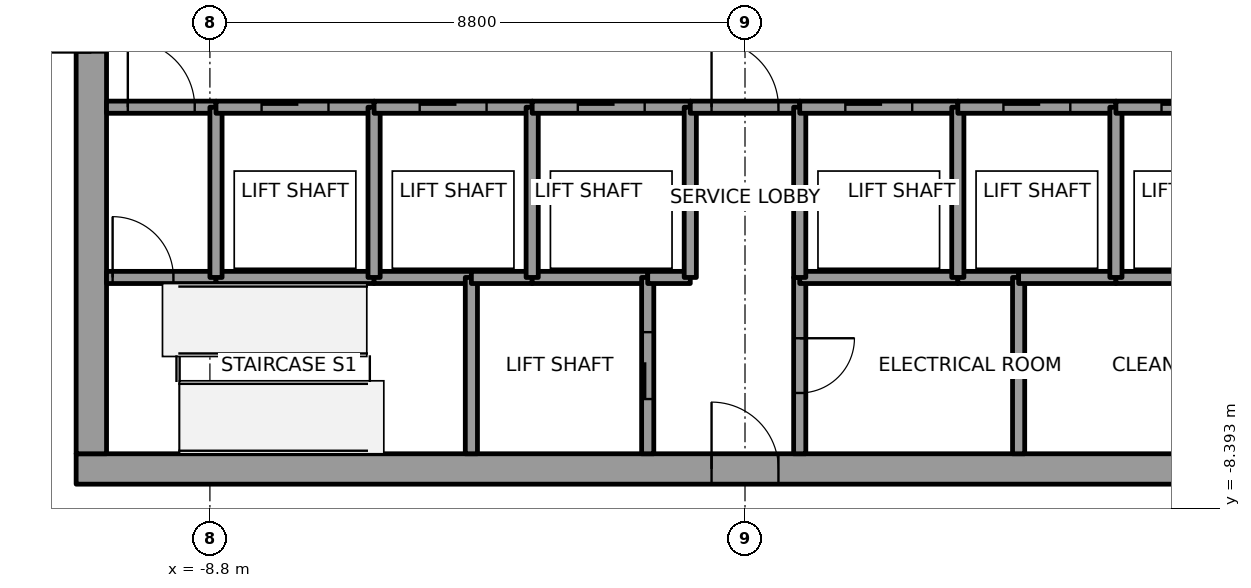
"""IFC4 building model, lengths in metres.
Left out: names, types, materials, properties, quantities, classifications, styles, units other than length and angle.
Written with IfcOpenShell. Run it as: python <this file> out.ifc"""

import sys

from ifc_helpers import new_model, si_unit, direction, frame, frame_2d, origin, place, context, subcontext, project, spatial, rectangle, extrude, element, fill, save


model = new_model("IFC4")
c1 = context("Model", 3, precision=1e-05, world=origin(), true_north=direction((0.0, 1.0)))
c2 = subcontext(c1, "Body", "Model", "MODEL_VIEW")
j1 = project(units=[si_unit("LENGTHUNIT", "METRE"), si_unit("PLANEANGLEUNIT", "RADIAN")], contexts=[c1])
p1 = place(None, origin())
s1 = spatial("IfcSite", under=j1, at=p1, CompositionType="ELEMENT")
p2 = place(p1, origin())
s2 = spatial("IfcBuilding", under=s1, at=p2, CompositionType="ELEMENT")
p3 = place(p2, frame((0.0, 0.0, 279.0)))
s3 = spatial("IfcBuildingStorey", under=s2, at=p3, CompositionType="ELEMENT", Elevation=279.0)
p4 = place(p3, frame((-11.0, -7.75, 0.0), z_axis=(0.0, 0.0, 1.0), x_axis=(1.0, 0.0, 0.0)))
e1 = element("IfcWall", 1, at=p4, inside=s3, PredefinedType="SHEAR", context=c2, shape_type="SweptSolid", body=[
    extrude(rectangle(XDim=22.0, YDim=0.5, at=frame_2d((11.0, 0.0))), origin(), (0.0, 0.0, 1.0), 4.0),
])
p5 = place(p4, frame((10.45, 0.0, 0.0)))
e2 = element("IfcOpeningElement", 2, at=p5, cuts=e1, PredefinedType="OPENING", context=c2, shape_type="SweptSolid", body=[
    extrude(rectangle(XDim=1.1, YDim=2.1, at=frame_2d((0.55, 1.05))), frame((0.0, 0.25, 0.0), z_axis=(0.0, -1.0, 0.0), x_axis=(1.0, 0.0, 0.0)), (0.0, 0.0, 1.0), 0.5),
])
p6 = place(p3, frame((-10.75, -7.5, 0.0), z_axis=(0.0, 0.0, 1.0), x_axis=(0.0, 1.0, 0.0)))
e3 = element("IfcWall", 3, at=p6, inside=s3, PredefinedType="SHEAR", context=c2, shape_type="SweptSolid", body=[
    extrude(rectangle(XDim=15.0, YDim=0.5, at=frame_2d((7.5, 0.0))), origin(), (0.0, 0.0, 1.0), 4.0),
])
p7 = place(p6, frame((6.6, 0.0, 0.0)))
e4 = element("IfcOpeningElement", 4, at=p7, cuts=e3, PredefinedType="OPENING", context=c2, shape_type="SweptSolid", body=[
    extrude(rectangle(XDim=1.8, YDim=2.1, at=frame_2d((0.9, 1.05))), frame((0.0, 0.25, 0.0), z_axis=(0.0, -1.0, 0.0), x_axis=(1.0, 0.0, 0.0)), (0.0, 0.0, 1.0), 0.5),
])
p8 = place(p3, frame((-10.5, -4.6, 0.0), z_axis=(0.0, 0.0, 1.0), x_axis=(1.0, 0.0, 0.0)))
e5 = element("IfcWall", 5, at=p8, inside=s3, PredefinedType="SOLIDWALL", context=c2, shape_type="SweptSolid", body=[
    extrude(rectangle(XDim=1.8, YDim=0.2, at=frame_2d((0.9, 0.0))), origin(), (0.0, 0.0, 1.0), 3.85),
])
p9 = place(p8, frame((0.1, 0.0, 0.0)))
e6 = element("IfcOpeningElement", 6, at=p9, cuts=e5, PredefinedType="OPENING", context=c2, shape_type="SweptSolid", body=[
    extrude(rectangle(XDim=1.0, YDim=2.1, at=frame_2d((0.5, 1.05))), frame((0.0, 0.1, 0.0), z_axis=(0.0, -1.0, 0.0), x_axis=(1.0, 0.0, 0.0)), (0.0, 0.0, 1.0), 0.2),
])
p10 = place(p3, frame((-10.5, -1.8, 0.0), z_axis=(0.0, 0.0, 1.0), x_axis=(1.0, 0.0, 0.0)))
e7 = element("IfcWall", 7, at=p10, inside=s3, PredefinedType="SOLIDWALL", context=c2, shape_type="SweptSolid", body=[
    extrude(rectangle(XDim=1.8, YDim=0.2, at=frame_2d((0.9, 0.0))), origin(), (0.0, 0.0, 1.0), 3.85),
])
p11 = place(p10, frame((0.35, 0.0, 0.0)))
e8 = element("IfcOpeningElement", 8, at=p11, cuts=e7, PredefinedType="OPENING", context=c2, shape_type="SweptSolid", body=[
    extrude(rectangle(XDim=1.1, YDim=2.1, at=frame_2d((0.55, 1.05))), frame((0.0, 0.1, 0.0), z_axis=(0.0, -1.0, 0.0), x_axis=(1.0, 0.0, 0.0)), (0.0, 0.0, 1.0), 0.2),
])
p12 = place(p3, frame((-8.7, -4.6, 0.0), z_axis=(0.0, 0.0, 1.0), x_axis=(1.0, 0.0, 0.0)))
e9 = element("IfcWall", 9, at=p12, inside=s3, PredefinedType="SOLIDWALL", context=c2, shape_type="SweptSolid", body=[
    extrude(rectangle(XDim=2.6, YDim=0.2, at=frame_2d((1.3, 0.0))), origin(), (0.0, 0.0, 1.0), 3.85),
])
p13 = place(p3, frame((-8.7, -4.6, 0.0), z_axis=(0.0, 0.0, 1.0), x_axis=(0.0, 1.0, 0.0)))
e10 = element("IfcWall", 10, at=p13, inside=s3, PredefinedType="SOLIDWALL", context=c2, shape_type="SweptSolid", body=[
    extrude(rectangle(XDim=2.8, YDim=0.2, at=frame_2d((1.4, 0.0))), origin(), (0.0, 0.0, 1.0), 3.85),
])
p14 = place(p3, frame((-8.7, -1.8, 0.0), z_axis=(0.0, 0.0, 1.0), x_axis=(1.0, 0.0, 0.0)))
e11 = element("IfcWall", 11, at=p14, inside=s3, PredefinedType="SOLIDWALL", context=c2, shape_type="SweptSolid", body=[
    extrude(rectangle(XDim=2.6, YDim=0.2, at=frame_2d((1.3, 0.0))), origin(), (0.0, 0.0, 1.0), 3.85),
])
p15 = place(p14, frame((0.75, 0.0, 0.0)))
e12 = element("IfcOpeningElement", 12, at=p15, cuts=e11, PredefinedType="OPENING", context=c2, shape_type="SweptSolid", body=[
    extrude(rectangle(XDim=1.1, YDim=2.1, at=frame_2d((0.55, 1.05))), frame((0.0, 0.1, 0.0), z_axis=(0.0, -1.0, 0.0), x_axis=(1.0, 0.0, 0.0)), (0.0, 0.0, 1.0), 0.2),
])
p16 = place(p3, frame((-6.1, -4.6, 0.0), z_axis=(0.0, 0.0, 1.0), x_axis=(1.0, 0.0, 0.0)))
e13 = element("IfcWall", 13, at=p16, inside=s3, PredefinedType="SOLIDWALL", context=c2, shape_type="SweptSolid", body=[
    extrude(rectangle(XDim=1.6, YDim=0.2, at=frame_2d((0.8, 0.0))), origin(), (0.0, 0.0, 1.0), 3.85),
])
p17 = place(p3, frame((-6.1, -4.6, 0.0), z_axis=(0.0, 0.0, 1.0), x_axis=(0.0, 1.0, 0.0)))
e14 = element("IfcWall", 14, at=p17, inside=s3, PredefinedType="SOLIDWALL", context=c2, shape_type="SweptSolid", body=[
    extrude(rectangle(XDim=2.8, YDim=0.2, at=frame_2d((1.4, 0.0))), origin(), (0.0, 0.0, 1.0), 3.85),
])
p18 = place(p3, frame((-6.1, -1.8, 0.0), z_axis=(0.0, 0.0, 1.0), x_axis=(1.0, 0.0, 0.0)))
e15 = element("IfcWall", 15, at=p18, inside=s3, PredefinedType="SOLIDWALL", context=c2, shape_type="SweptSolid", body=[
    extrude(rectangle(XDim=2.6, YDim=0.2, at=frame_2d((1.3, 0.0))), origin(), (0.0, 0.0, 1.0), 3.85),
])
p19 = place(p18, frame((0.75, 0.0, 0.0)))
e16 = element("IfcOpeningElement", 16, at=p19, cuts=e15, PredefinedType="OPENING", context=c2, shape_type="SweptSolid", body=[
    extrude(rectangle(XDim=1.1, YDim=2.1, at=frame_2d((0.55, 1.05))), frame((0.0, 0.1, 0.0), z_axis=(0.0, -1.0, 0.0), x_axis=(1.0, 0.0, 0.0)), (0.0, 0.0, 1.0), 0.2),
])
p20 = place(p3, frame((-4.5, -4.6, 0.0), z_axis=(0.0, 0.0, 1.0), x_axis=(0.0, -1.0, 0.0)))
e17 = element("IfcWall", 17, at=p20, inside=s3, PredefinedType="SOLIDWALL", context=c2, shape_type="SweptSolid", body=[
    extrude(rectangle(XDim=2.9, YDim=0.2, at=frame_2d((1.45, 0.0))), origin(), (0.0, 0.0, 1.0), 3.85),
])
p21 = place(p3, frame((-4.5, -4.6, 0.0), z_axis=(0.0, 0.0, 1.0), x_axis=(1.0, 0.0, 0.0)))
e18 = element("IfcWall", 18, at=p21, inside=s3, PredefinedType="SOLIDWALL", context=c2, shape_type="SweptSolid", body=[
    extrude(rectangle(XDim=1.0, YDim=0.2, at=frame_2d((0.5, 0.0))), origin(), (0.0, 0.0, 1.0), 3.85),
])
p22 = place(p3, frame((-3.5, -4.6, 0.0), z_axis=(0.0, 0.0, 1.0), x_axis=(1.0, 0.0, 0.0)))
e19 = element("IfcWall", 19, at=p22, inside=s3, PredefinedType="SOLIDWALL", context=c2, shape_type="SweptSolid", body=[
    extrude(rectangle(XDim=1.9, YDim=0.2, at=frame_2d((0.95, 0.0))), origin(), (0.0, 0.0, 1.0), 3.85),
])
p23 = place(p3, frame((-3.5, -4.6, 0.0), z_axis=(0.0, 0.0, 1.0), x_axis=(0.0, 1.0, 0.0)))
e20 = element("IfcWall", 20, at=p23, inside=s3, PredefinedType="SOLIDWALL", context=c2, shape_type="SweptSolid", body=[
    extrude(rectangle(XDim=2.8, YDim=0.2, at=frame_2d((1.4, 0.0))), origin(), (0.0, 0.0, 1.0), 3.85),
])
p24 = place(p3, frame((-3.5, -1.8, 0.0), z_axis=(0.0, 0.0, 1.0), x_axis=(1.0, 0.0, 0.0)))
e21 = element("IfcWall", 21, at=p24, inside=s3, PredefinedType="SOLIDWALL", context=c2, shape_type="SweptSolid", body=[
    extrude(rectangle(XDim=2.6, YDim=0.2, at=frame_2d((1.3, 0.0))), origin(), (0.0, 0.0, 1.0), 3.85),
])
p25 = place(p24, frame((0.75, 0.0, 0.0)))
e22 = element("IfcOpeningElement", 22, at=p25, cuts=e21, PredefinedType="OPENING", context=c2, shape_type="SweptSolid", body=[
    extrude(rectangle(XDim=1.1, YDim=2.1, at=frame_2d((0.55, 1.05))), frame((0.0, 0.1, 0.0), z_axis=(0.0, -1.0, 0.0), x_axis=(1.0, 0.0, 0.0)), (0.0, 0.0, 1.0), 0.2),
])
p26 = place(p3, frame((-1.6, -7.5, 0.0), z_axis=(0.0, 0.0, 1.0), x_axis=(0.0, 1.0, 0.0)))
e23 = element("IfcWall", 23, at=p26, inside=s3, PredefinedType="SOLIDWALL", context=c2, shape_type="SweptSolid", body=[
    extrude(rectangle(XDim=2.9, YDim=0.2, at=frame_2d((1.45, 0.0))), origin(), (0.0, 0.0, 1.0), 3.85),
])
p27 = place(p26, frame((0.9, 0.0, 0.0)))
e24 = element("IfcOpeningElement", 24, at=p27, cuts=e23, PredefinedType="OPENING", context=c2, shape_type="SweptSolid", body=[
    extrude(rectangle(XDim=1.1, YDim=2.1, at=frame_2d((0.55, 1.05))), frame((0.0, 0.1, 0.0), z_axis=(0.0, -1.0, 0.0), x_axis=(1.0, 0.0, 0.0)), (0.0, 0.0, 1.0), 0.2),
])
p28 = place(p3, frame((-1.6, -4.6, 0.0), z_axis=(0.0, 0.0, 1.0), x_axis=(1.0, 0.0, 0.0)))
e25 = element("IfcWall", 25, at=p28, inside=s3, PredefinedType="SOLIDWALL", context=c2, shape_type="SweptSolid", body=[
    extrude(rectangle(XDim=0.7, YDim=0.2, at=frame_2d((0.35, 0.0))), origin(), (0.0, 0.0, 1.0), 3.85),
])
p29 = place(p3, frame((-0.9, -4.6, 0.0), z_axis=(0.0, 0.0, 1.0), x_axis=(0.0, 1.0, 0.0)))
e26 = element("IfcWall", 26, at=p29, inside=s3, PredefinedType="SOLIDWALL", context=c2, shape_type="SweptSolid", body=[
    extrude(rectangle(XDim=2.8, YDim=0.2, at=frame_2d((1.4, 0.0))), origin(), (0.0, 0.0, 1.0), 3.85),
])
p30 = place(p3, frame((-0.9, -1.8, 0.0), z_axis=(0.0, 0.0, 1.0), x_axis=(1.0, 0.0, 0.0)))
e27 = element("IfcWall", 27, at=p30, inside=s3, PredefinedType="SOLIDWALL", context=c2, shape_type="SweptSolid", body=[
    extrude(rectangle(XDim=1.8, YDim=0.2, at=frame_2d((0.9, 0.0))), origin(), (0.0, 0.0, 1.0), 3.85),
])
p31 = place(p30, frame((0.35, 0.0, 0.0)))
e28 = element("IfcOpeningElement", 28, at=p31, cuts=e27, PredefinedType="OPENING", context=c2, shape_type="SweptSolid", body=[
    extrude(rectangle(XDim=1.1, YDim=2.1, at=frame_2d((0.55, 1.05))), frame((0.0, 0.1, 0.0), z_axis=(0.0, -1.0, 0.0), x_axis=(1.0, 0.0, 0.0)), (0.0, 0.0, 1.0), 0.2),
])
p32 = place(p3, frame((0.9, -4.6, 0.0), z_axis=(0.0, 0.0, 1.0), x_axis=(0.0, -1.0, 0.0)))
e29 = element("IfcWall", 29, at=p32, inside=s3, PredefinedType="SOLIDWALL", context=c2, shape_type="SweptSolid", body=[
    extrude(rectangle(XDim=2.9, YDim=0.2, at=frame_2d((1.45, 0.0))), origin(), (0.0, 0.0, 1.0), 3.85),
])
p33 = place(p32, frame((1.0, 0.0, 0.0)))
e30 = element("IfcOpeningElement", 30, at=p33, cuts=e29, PredefinedType="OPENING", context=c2, shape_type="SweptSolid", body=[
    extrude(rectangle(XDim=0.9, YDim=2.1, at=frame_2d((0.45, 1.05))), frame((0.0, 0.1, 0.0), z_axis=(0.0, -1.0, 0.0), x_axis=(1.0, 0.0, 0.0)), (0.0, 0.0, 1.0), 0.2),
])
p34 = place(p3, frame((3.5, -4.6, 0.0), z_axis=(0.0, 0.0, 1.0), x_axis=(-1.0, 0.0, 0.0)))
e31 = element("IfcWall", 31, at=p34, inside=s3, PredefinedType="SOLIDWALL", context=c2, shape_type="SweptSolid", body=[
    extrude(rectangle(XDim=2.6, YDim=0.2, at=frame_2d((1.3, 0.0))), origin(), (0.0, 0.0, 1.0), 3.85),
])
p35 = place(p3, frame((0.9, -1.8, 0.0), z_axis=(0.0, 0.0, 1.0), x_axis=(0.0, -1.0, 0.0)))
e32 = element("IfcWall", 32, at=p35, inside=s3, PredefinedType="SOLIDWALL", context=c2, shape_type="SweptSolid", body=[
    extrude(rectangle(XDim=2.8, YDim=0.2, at=frame_2d((1.4, 0.0))), origin(), (0.0, 0.0, 1.0), 3.85),
])
p36 = place(p3, frame((0.9, -1.8, 0.0), z_axis=(0.0, 0.0, 1.0), x_axis=(1.0, 0.0, 0.0)))
e33 = element("IfcWall", 33, at=p36, inside=s3, PredefinedType="SOLIDWALL", context=c2, shape_type="SweptSolid", body=[
    extrude(rectangle(XDim=2.6, YDim=0.2, at=frame_2d((1.3, 0.0))), origin(), (0.0, 0.0, 1.0), 3.85),
])
p37 = place(p36, frame((0.75, 0.0, 0.0)))
e34 = element("IfcOpeningElement", 34, at=p37, cuts=e33, PredefinedType="OPENING", context=c2, shape_type="SweptSolid", body=[
    extrude(rectangle(XDim=1.1, YDim=2.1, at=frame_2d((0.55, 1.05))), frame((0.0, 0.1, 0.0), z_axis=(0.0, -1.0, 0.0), x_axis=(1.0, 0.0, 0.0)), (0.0, 0.0, 1.0), 0.2),
])
p38 = place(p3, frame((4.5, -4.6, 0.0), z_axis=(0.0, 0.0, 1.0), x_axis=(-1.0, 0.0, 0.0)))
e35 = element("IfcWall", 35, at=p38, inside=s3, PredefinedType="SOLIDWALL", context=c2, shape_type="SweptSolid", body=[
    extrude(rectangle(XDim=1.0, YDim=0.2, at=frame_2d((0.5, 0.0))), origin(), (0.0, 0.0, 1.0), 3.85),
])
p39 = place(p3, frame((3.5, -4.6, 0.0), z_axis=(0.0, 0.0, 1.0), x_axis=(0.0, 1.0, 0.0)))
e36 = element("IfcWall", 36, at=p39, inside=s3, PredefinedType="SOLIDWALL", context=c2, shape_type="SweptSolid", body=[
    extrude(rectangle(XDim=2.8, YDim=0.2, at=frame_2d((1.4, 0.0))), origin(), (0.0, 0.0, 1.0), 3.85),
])
p40 = place(p3, frame((3.5, -1.8, 0.0), z_axis=(0.0, 0.0, 1.0), x_axis=(1.0, 0.0, 0.0)))
e37 = element("IfcWall", 37, at=p40, inside=s3, PredefinedType="SOLIDWALL", context=c2, shape_type="SweptSolid", body=[
    extrude(rectangle(XDim=2.6, YDim=0.2, at=frame_2d((1.3, 0.0))), origin(), (0.0, 0.0, 1.0), 3.85),
])
p41 = place(p40, frame((0.75, 0.0, 0.0)))
e38 = element("IfcOpeningElement", 38, at=p41, cuts=e37, PredefinedType="OPENING", context=c2, shape_type="SweptSolid", body=[
    extrude(rectangle(XDim=1.1, YDim=2.1, at=frame_2d((0.55, 1.05))), frame((0.0, 0.1, 0.0), z_axis=(0.0, -1.0, 0.0), x_axis=(1.0, 0.0, 0.0)), (0.0, 0.0, 1.0), 0.2),
])
p42 = place(p3, frame((4.5, -4.6, 0.0), z_axis=(0.0, 0.0, 1.0), x_axis=(0.0, -1.0, 0.0)))
e39 = element("IfcWall", 39, at=p42, inside=s3, PredefinedType="SOLIDWALL", context=c2, shape_type="SweptSolid", body=[
    extrude(rectangle(XDim=2.9, YDim=0.2, at=frame_2d((1.45, 0.0))), origin(), (0.0, 0.0, 1.0), 3.85),
])
p43 = place(p3, frame((6.1, -4.6, 0.0), z_axis=(0.0, 0.0, 1.0), x_axis=(-1.0, 0.0, 0.0)))
e40 = element("IfcWall", 40, at=p43, inside=s3, PredefinedType="SOLIDWALL", context=c2, shape_type="SweptSolid", body=[
    extrude(rectangle(XDim=1.6, YDim=0.2, at=frame_2d((0.8, 0.0))), origin(), (0.0, 0.0, 1.0), 3.85),
])
p44 = place(p3, frame((8.7, -4.6, 0.0), z_axis=(0.0, 0.0, 1.0), x_axis=(-1.0, 0.0, 0.0)))
e41 = element("IfcWall", 41, at=p44, inside=s3, PredefinedType="SOLIDWALL", context=c2, shape_type="SweptSolid", body=[
    extrude(rectangle(XDim=2.6, YDim=0.2, at=frame_2d((1.3, 0.0))), origin(), (0.0, 0.0, 1.0), 3.85),
])
p45 = place(p3, frame((6.1, -4.6, 0.0), z_axis=(0.0, 0.0, 1.0), x_axis=(0.0, 1.0, 0.0)))
e42 = element("IfcWall", 42, at=p45, inside=s3, PredefinedType="SOLIDWALL", context=c2, shape_type="SweptSolid", body=[
    extrude(rectangle(XDim=2.8, YDim=0.2, at=frame_2d((1.4, 0.0))), origin(), (0.0, 0.0, 1.0), 3.85),
])
p46 = place(p3, frame((6.1, -1.8, 0.0), z_axis=(0.0, 0.0, 1.0), x_axis=(1.0, 0.0, 0.0)))
e43 = element("IfcWall", 43, at=p46, inside=s3, PredefinedType="SOLIDWALL", context=c2, shape_type="SweptSolid", body=[
    extrude(rectangle(XDim=2.6, YDim=0.2, at=frame_2d((1.3, 0.0))), origin(), (0.0, 0.0, 1.0), 3.85),
])
p47 = place(p46, frame((0.75, 0.0, 0.0)))
e44 = element("IfcOpeningElement", 44, at=p47, cuts=e43, PredefinedType="OPENING", context=c2, shape_type="SweptSolid", body=[
    extrude(rectangle(XDim=1.1, YDim=2.1, at=frame_2d((0.55, 1.05))), frame((0.0, 0.1, 0.0), z_axis=(0.0, -1.0, 0.0), x_axis=(1.0, 0.0, 0.0)), (0.0, 0.0, 1.0), 0.2),
])
p48 = place(p15, origin())
e45 = element("IfcDoor", 45, at=p48, inside=s3, OperationType="SLIDING_TO_LEFT", PredefinedType="DOOR", context=c2, shape_type="SweptSolid", body=[
    extrude(rectangle(XDim=1.1, YDim=2.1, at=frame_2d((0.55, 1.05))), frame((0.0, 0.025, 0.0), z_axis=(0.0, -1.0, 0.0), x_axis=(1.0, 0.0, 0.0)), (0.0, 0.0, 1.0), 0.05),
])
fill(e12, e45)
p49 = place(p19, origin())
e46 = element("IfcDoor", 46, at=p49, inside=s3, OperationType="SLIDING_TO_LEFT", PredefinedType="DOOR", context=c2, shape_type="SweptSolid", body=[
    extrude(rectangle(XDim=1.1, YDim=2.1, at=frame_2d((0.55, 1.05))), frame((0.0, 0.025, 0.0), z_axis=(0.0, -1.0, 0.0), x_axis=(1.0, 0.0, 0.0)), (0.0, 0.0, 1.0), 0.05),
])
fill(e16, e46)
p50 = place(p25, origin())
e47 = element("IfcDoor", 47, at=p50, inside=s3, OperationType="SLIDING_TO_LEFT", PredefinedType="DOOR", context=c2, shape_type="SweptSolid", body=[
    extrude(rectangle(XDim=1.1, YDim=2.1, at=frame_2d((0.55, 1.05))), frame((0.0, 0.025, 0.0), z_axis=(0.0, -1.0, 0.0), x_axis=(1.0, 0.0, 0.0)), (0.0, 0.0, 1.0), 0.05),
])
fill(e22, e47)
p51 = place(p37, origin())
e48 = element("IfcDoor", 48, at=p51, inside=s3, OperationType="SLIDING_TO_RIGHT", PredefinedType="DOOR", context=c2, shape_type="SweptSolid", body=[
    extrude(rectangle(XDim=1.1, YDim=2.1, at=frame_2d((0.55, 1.05))), frame((0.0, 0.025, 0.0), z_axis=(0.0, -1.0, 0.0), x_axis=(1.0, 0.0, 0.0)), (0.0, 0.0, 1.0), 0.05),
])
fill(e34, e48)
p52 = place(p41, origin())
e49 = element("IfcDoor", 49, at=p52, inside=s3, OperationType="SLIDING_TO_RIGHT", PredefinedType="DOOR", context=c2, shape_type="SweptSolid", body=[
    extrude(rectangle(XDim=1.1, YDim=2.1, at=frame_2d((0.55, 1.05))), frame((0.0, 0.025, 0.0), z_axis=(0.0, -1.0, 0.0), x_axis=(1.0, 0.0, 0.0)), (0.0, 0.0, 1.0), 0.05),
])
fill(e38, e49)
p53 = place(p47, origin())
e50 = element("IfcDoor", 50, at=p53, inside=s3, OperationType="SLIDING_TO_LEFT", PredefinedType="DOOR", context=c2, shape_type="SweptSolid", body=[
    extrude(rectangle(XDim=1.1, YDim=2.1, at=frame_2d((0.55, 1.05))), frame((0.0, 0.025, 0.0), z_axis=(0.0, -1.0, 0.0), x_axis=(1.0, 0.0, 0.0)), (0.0, 0.0, 1.0), 0.05),
])
fill(e44, e50)
p54 = place(p27, origin())
e51 = element("IfcDoor", 51, at=p54, inside=s3, OperationType="SLIDING_TO_RIGHT", PredefinedType="DOOR", context=c2, shape_type="SweptSolid", body=[
    extrude(rectangle(XDim=1.1, YDim=2.1, at=frame_2d((0.55, 1.05))), frame((0.0, 0.025, 0.0), z_axis=(0.0, -1.0, 0.0), x_axis=(1.0, 0.0, 0.0)), (0.0, 0.0, 1.0), 0.05),
])
fill(e24, e51)
p55 = place(p11, origin())
e52 = element("IfcDoor", 52, at=p55, inside=s3, OperationType="SINGLE_SWING_LEFT", PredefinedType="DOOR", context=c2, shape_type="SweptSolid", body=[
    extrude(rectangle(XDim=1.1, YDim=2.1, at=frame_2d((0.55, 1.05))), frame((0.0, 0.025, 0.0), z_axis=(0.0, -1.0, 0.0), x_axis=(1.0, 0.0, 0.0)), (0.0, 0.0, 1.0), 0.05),
])
fill(e8, e52)
p56 = place(p31, origin())
e53 = element("IfcDoor", 53, at=p56, inside=s3, OperationType="SINGLE_SWING_RIGHT", PredefinedType="DOOR", context=c2, shape_type="SweptSolid", body=[
    extrude(rectangle(XDim=1.1, YDim=2.1, at=frame_2d((0.55, 1.05))), frame((0.0, 0.025, 0.0), z_axis=(0.0, -1.0, 0.0), x_axis=(1.0, 0.0, 0.0)), (0.0, 0.0, 1.0), 0.05),
])
fill(e28, e53)
p57 = place(p9, origin())
e54 = element("IfcDoor", 54, at=p57, inside=s3, OperationType="SINGLE_SWING_LEFT", PredefinedType="DOOR", context=c2, shape_type="SweptSolid", body=[
    extrude(rectangle(XDim=1.0, YDim=2.1, at=frame_2d((0.5, 1.05))), frame((0.0, 0.025, 0.0), z_axis=(0.0, -1.0, 0.0), x_axis=(1.0, 0.0, 0.0)), (0.0, 0.0, 1.0), 0.05),
])
fill(e6, e54)
p58 = place(p33, origin())
e55 = element("IfcDoor", 55, at=p58, inside=s3, OperationType="SINGLE_SWING_RIGHT", PredefinedType="DOOR", context=c2, shape_type="SweptSolid", body=[
    extrude(rectangle(XDim=0.9, YDim=2.1, at=frame_2d((0.45, 1.05))), frame((0.0, 0.025, 0.0), z_axis=(0.0, -1.0, 0.0), x_axis=(1.0, 0.0, 0.0)), (0.0, 0.0, 1.0), 0.05),
])
fill(e30, e55)
p59 = place(p7, origin())
e56 = element("IfcDoor", 56, at=p59, inside=s3, OperationType="DOUBLE_DOOR_SINGLE_SWING", PredefinedType="DOOR", context=c2, shape_type="SweptSolid", body=[
    extrude(rectangle(XDim=1.8, YDim=2.1, at=frame_2d((0.9, 1.05))), frame((0.0, 0.025, 0.0), z_axis=(0.0, -1.0, 0.0), x_axis=(1.0, 0.0, 0.0)), (0.0, 0.0, 1.0), 0.05),
])
fill(e4, e56)
p60 = place(p5, origin())
e57 = element("IfcDoor", 57, at=p60, inside=s3, OperationType="SINGLE_SWING_RIGHT", PredefinedType="DOOR", context=c2, shape_type="SweptSolid", body=[
    extrude(rectangle(XDim=1.1, YDim=2.1, at=frame_2d((0.55, 1.05))), frame((0.0, 0.025, 0.0), z_axis=(0.0, -1.0, 0.0), x_axis=(1.0, 0.0, 0.0)), (0.0, 0.0, 1.0), 0.05),
])
fill(e2, e57)
save(model, sys.argv[1])
